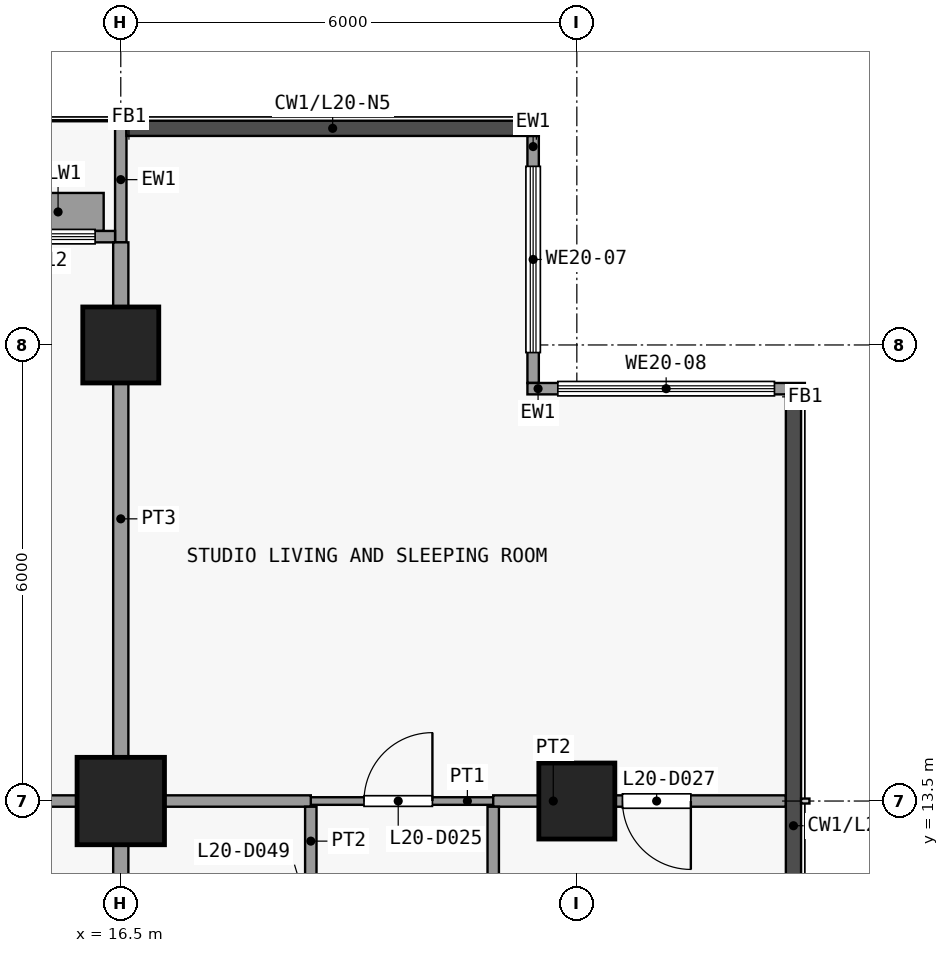
"""IFC4 building model, lengths in metres.
Left out: names, types, materials, properties, quantities, classifications, styles, units other than length and angle.
Written with IfcOpenShell. Run it as: python <this file> out.ifc"""

import sys

from ifc_helpers import new_model, si_unit, direction, frame, frame_2d, origin, origin_2d, place, context, subcontext, project, spatial, rectangle, extrude, element, fill, save


model = new_model("IFC4")
c1 = context("Model", 3, precision=1e-05, world=origin(), true_north=direction((0.0, 1.0)))
c2 = subcontext(c1, "Body", "Model", "MODEL_VIEW")
j1 = project(units=[si_unit("LENGTHUNIT", "METRE"), si_unit("PLANEANGLEUNIT", "RADIAN")], contexts=[c1])
p1 = place(None, origin())
s1 = spatial("IfcSite", under=j1, at=p1, CompositionType="ELEMENT")
p2 = place(p1, origin())
s2 = spatial("IfcBuilding", under=s1, at=p2, CompositionType="ELEMENT")
p3 = place(p2, frame((0.0, 0.0, 84.7)))
s3 = spatial("IfcBuildingStorey", under=s2, at=p3, CompositionType="ELEMENT", Elevation=84.7)
p4 = place(p3, frame((16.5, 13.5, 0.0), z_axis=(0.0, 0.0, 1.0), x_axis=(1.0, 0.0, 0.0)))
e1 = element("IfcColumn", 1, at=p4, inside=s3, PredefinedType="COLUMN", context=c2, shape_type="SweptSolid", body=[
    extrude(rectangle(XDim=1.15, YDim=1.15, at=origin_2d()), origin(), (0.0, 0.0, 1.0), 3.6),
])
for number, where, z_axis, x_axis in (
    (2, (16.5, 19.5, 0.0), (0.0, 0.0, 1.0), (1.0, 0.0, 0.0)),
    (3, (22.5, 13.5, 0.0), (0.0, 0.0, 1.0), (1.0, 0.0, 0.0)),
):
    element("IfcColumn", number, at=place(p3, frame(where, z_axis=z_axis, x_axis=x_axis)), inside=s3, PredefinedType="COLUMN", context=c2, shape_type="SweptSolid", body=[
        extrude(rectangle(XDim=1.0, YDim=1.0, at=origin_2d()), origin(), (0.0, 0.0, 1.0), 3.6),
    ])
p5 = place(p3, frame((21.925, 22.25, 0.0), z_axis=(0.0, 0.0, 1.0), x_axis=(0.0, -1.0, 0.0)))
e4 = element("IfcWall", 4, at=p5, inside=s3, PredefinedType="SOLIDWALL", context=c2, shape_type="SweptSolid", body=[
    extrude(rectangle(XDim=3.25, YDim=0.15, at=frame_2d((1.625, 0.0))), origin(), (0.0, 0.0, 1.0), 3.3),
])
p6 = place(p5, frame((0.4, 0.0, 0.9)))
e5 = element("IfcOpeningElement", 5, at=p6, cuts=e4, PredefinedType="OPENING", context=c2, shape_type="SweptSolid", body=[
    extrude(rectangle(XDim=2.45, YDim=2.4, at=frame_2d((1.225, 1.2))), frame((0.0, 0.085, 0.0), z_axis=(0.0, -1.0, 0.0), x_axis=(1.0, 0.0, 0.0)), (0.0, 0.0, 1.0), 0.17),
])
p7 = place(p3, frame((21.85, 18.925, 0.0), z_axis=(0.0, 0.0, 1.0), x_axis=(1.0, 0.0, 0.0)))
e6 = element("IfcWall", 6, at=p7, inside=s3, PredefinedType="SOLIDWALL", context=c2, shape_type="SweptSolid", body=[
    extrude(rectangle(XDim=3.65, YDim=0.15, at=frame_2d((1.825, 0.0))), origin(), (0.0, 0.0, 1.0), 3.3),
])
p8 = place(p7, frame((0.4, 0.0, 0.9)))
e7 = element("IfcOpeningElement", 7, at=p8, cuts=e6, PredefinedType="OPENING", context=c2, shape_type="SweptSolid", body=[
    extrude(rectangle(XDim=2.85, YDim=2.4, at=frame_2d((1.425, 1.2))), frame((0.0, 0.085, 0.0), z_axis=(0.0, -1.0, 0.0), x_axis=(1.0, 0.0, 0.0)), (0.0, 0.0, 1.0), 0.17),
])
p9 = place(p3, frame((16.5, 20.85, 0.0), z_axis=(0.0, 0.0, 1.0), x_axis=(0.0, 1.0, 0.0)))
e8 = element("IfcWall", 8, at=p9, inside=s3, PredefinedType="SOLIDWALL", context=c2, shape_type="SweptSolid", body=[
    extrude(rectangle(XDim=1.65, YDim=0.15, at=frame_2d((0.825, 0.0))), origin(), (0.0, 0.0, 1.0), 3.3),
])
p10 = place(p3, frame((10.575, 20.925, 0.0), z_axis=(0.0, 0.0, 1.0), x_axis=(1.0, 0.0, 0.0)))
e9 = element("IfcWall", 9, at=p10, inside=s3, PredefinedType="SOLIDWALL", context=c2, shape_type="SweptSolid", body=[
    extrude(rectangle(XDim=5.85, YDim=0.15, at=frame_2d((2.925, 0.0))), origin(), (0.0, 0.0, 1.0), 3.3),
])
p11 = place(p10, frame((2.325, 0.0, 0.0)))
e10 = element("IfcOpeningElement", 10, at=p11, cuts=e9, PredefinedType="OPENING", context=c2, shape_type="SweptSolid", body=[
    extrude(rectangle(XDim=1.2, YDim=2.4, at=frame_2d((0.6, 1.2))), frame((0.0, 0.085, 0.0), z_axis=(0.0, -1.0, 0.0), x_axis=(1.0, 0.0, 0.0)), (0.0, 0.0, 1.0), 0.17),
])
p12 = place(p10, frame((0.262, 0.0, 0.9)))
e11 = element("IfcOpeningElement", 11, at=p12, cuts=e9, PredefinedType="OPENING", context=c2, shape_type="SweptSolid", body=[
    extrude(rectangle(XDim=1.8, YDim=2.1, at=frame_2d((0.9, 1.05))), frame((0.0, 0.085, 0.0), z_axis=(0.0, -1.0, 0.0), x_axis=(1.0, 0.0, 0.0)), (0.0, 0.0, 1.0), 0.17),
])
p13 = place(p10, frame((3.788, 0.0, 0.9)))
e12 = element("IfcOpeningElement", 12, at=p13, cuts=e9, PredefinedType="OPENING", context=c2, shape_type="SweptSolid", body=[
    extrude(rectangle(XDim=1.8, YDim=2.1, at=frame_2d((0.9, 1.05))), frame((0.0, 0.085, 0.0), z_axis=(0.0, -1.0, 0.0), x_axis=(1.0, 0.0, 0.0)), (0.0, 0.0, 1.0), 0.17),
])
p14 = place(p3, frame((15.075, 21.25, 0.0), z_axis=(0.0, 0.0, 1.0), x_axis=(1.0, 0.0, 0.0)))
e13 = element("IfcWall", 13, at=p14, inside=s3, PredefinedType="USERDEFINED", context=c2, shape_type="SweptSolid", body=[
    extrude(rectangle(XDim=1.2, YDim=0.5, at=frame_2d((0.6, 0.0))), origin(), (0.0, 0.0, 1.0), 0.9),
])
p15 = place(p3, frame((19.0, 13.5, 0.0), z_axis=(0.0, 0.0, 1.0), x_axis=(1.0, 0.0, 0.0)))
e14 = element("IfcWall", 14, at=p15, inside=s3, PredefinedType="PARTITIONING", context=c2, shape_type="SweptSolid", body=[
    extrude(rectangle(XDim=2.4, YDim=0.1, at=frame_2d((1.2, 0.0))), origin(), (0.0, 0.0, 1.0), 3.3),
])
p16 = place(p15, frame((0.7, 0.0, 0.0)))
e15 = element("IfcOpeningElement", 15, at=p16, cuts=e14, PredefinedType="OPENING", context=c2, shape_type="SweptSolid", body=[
    extrude(rectangle(XDim=0.9, YDim=2.1, at=frame_2d((0.45, 1.05))), frame((0.0, 0.06, 0.0), z_axis=(0.0, -1.0, 0.0), x_axis=(1.0, 0.0, 0.0)), (0.0, 0.0, 1.0), 0.12),
])
p17 = place(p3, frame((10.65, 13.5, 0.0), z_axis=(0.0, 0.0, 1.0), x_axis=(1.0, 0.0, 0.0)))
e16 = element("IfcWall", 16, at=p17, inside=s3, PredefinedType="PARTITIONING", context=c2, shape_type="SweptSolid", body=[
    extrude(rectangle(XDim=8.35, YDim=0.15, at=frame_2d((4.175, 0.0))), origin(), (0.0, 0.0, 1.0), 3.3),
])
p18 = place(p3, frame((21.4, 13.5, 0.0), z_axis=(0.0, 0.0, 1.0), x_axis=(1.0, 0.0, 0.0)))
e17 = element("IfcWall", 17, at=p18, inside=s3, PredefinedType="PARTITIONING", context=c2, shape_type="SweptSolid", body=[
    extrude(rectangle(XDim=3.85, YDim=0.15, at=frame_2d((1.925, 0.0))), origin(), (0.0, 0.0, 1.0), 3.3),
])
p19 = place(p18, frame((1.7, 0.0, 0.0)))
e18 = element("IfcOpeningElement", 18, at=p19, cuts=e17, PredefinedType="OPENING", context=c2, shape_type="SweptSolid", body=[
    extrude(rectangle(XDim=0.9, YDim=2.1, at=frame_2d((0.45, 1.05))), frame((0.0, 0.085, 0.0), z_axis=(0.0, -1.0, 0.0), x_axis=(1.0, 0.0, 0.0)), (0.0, 0.0, 1.0), 0.17),
])
p20 = place(p3, frame((16.5, 10.6, 0.0), z_axis=(0.0, 0.0, 1.0), x_axis=(0.0, 1.0, 0.0)))
e19 = element("IfcWall", 19, at=p20, inside=s3, PredefinedType="PARTITIONING", context=c2, shape_type="SweptSolid", body=[
    extrude(rectangle(XDim=2.825, YDim=0.2, at=frame_2d((1.413, 0.0))), origin(), (0.0, 0.0, 1.0), 3.3),
])
p21 = place(p3, frame((16.5, 13.575, 0.0), z_axis=(0.0, 0.0, 1.0), x_axis=(0.0, 1.0, 0.0)))
e20 = element("IfcWall", 20, at=p21, inside=s3, PredefinedType="PARTITIONING", context=c2, shape_type="SweptSolid", body=[
    extrude(rectangle(XDim=7.275, YDim=0.2, at=frame_2d((3.638, 0.0))), origin(), (0.0, 0.0, 1.0), 3.3),
])
p22 = place(p3, frame((19.0, 10.6, 0.0), z_axis=(0.0, 0.0, 1.0), x_axis=(0.0, 1.0, 0.0)))
e21 = element("IfcWall", 21, at=p22, inside=s3, PredefinedType="PARTITIONING", context=c2, shape_type="SweptSolid", body=[
    extrude(rectangle(XDim=2.825, YDim=0.15, at=frame_2d((1.413, 0.0))), origin(), (0.0, 0.0, 1.0), 3.3),
])
p23 = place(p22, frame((0.9, 0.0, 0.0)))
e22 = element("IfcOpeningElement", 22, at=p23, cuts=e21, PredefinedType="OPENING", context=c2, shape_type="SweptSolid", body=[
    extrude(rectangle(XDim=0.9, YDim=2.1, at=frame_2d((0.45, 1.05))), frame((0.0, 0.085, 0.0), z_axis=(0.0, -1.0, 0.0), x_axis=(1.0, 0.0, 0.0)), (0.0, 0.0, 1.0), 0.17),
])
p24 = place(p3, frame((21.4, 10.6, 0.0), z_axis=(0.0, 0.0, 1.0), x_axis=(0.0, 1.0, 0.0)))
e23 = element("IfcWall", 23, at=p24, inside=s3, PredefinedType="PARTITIONING", context=c2, shape_type="SweptSolid", body=[
    extrude(rectangle(XDim=2.825, YDim=0.15, at=frame_2d((1.413, 0.0))), origin(), (0.0, 0.0, 1.0), 3.3),
])
p25 = place(p6, origin())
e24 = element("IfcWindow", 24, at=p25, inside=s3, PartitioningType="SINGLE_PANEL", PredefinedType="WINDOW", context=c2, shape_type="SweptSolid", body=[
    extrude(rectangle(XDim=2.45, YDim=2.4, at=frame_2d((1.225, 1.2))), frame((0.0, 0.03, 0.0), z_axis=(0.0, -1.0, 0.0), x_axis=(1.0, 0.0, 0.0)), (0.0, 0.0, 1.0), 0.06),
])
fill(e5, e24)
p26 = place(p8, origin())
e25 = element("IfcWindow", 25, at=p26, inside=s3, PartitioningType="SINGLE_PANEL", PredefinedType="WINDOW", context=c2, shape_type="SweptSolid", body=[
    extrude(rectangle(XDim=2.85, YDim=2.4, at=frame_2d((1.425, 1.2))), frame((0.0, 0.03, 0.0), z_axis=(0.0, -1.0, 0.0), x_axis=(1.0, 0.0, 0.0)), (0.0, 0.0, 1.0), 0.06),
])
fill(e7, e25)
p27 = place(p13, origin())
e26 = element("IfcWindow", 26, at=p27, inside=s3, PartitioningType="SINGLE_PANEL", PredefinedType="WINDOW", context=c2, shape_type="SweptSolid", body=[
    extrude(rectangle(XDim=1.8, YDim=2.1, at=frame_2d((0.9, 1.05))), frame((0.0, 0.03, 0.0), z_axis=(0.0, -1.0, 0.0), x_axis=(1.0, 0.0, 0.0)), (0.0, 0.0, 1.0), 0.06),
])
fill(e12, e26)
p28 = place(p16, origin())
e27 = element("IfcDoor", 27, at=p28, inside=s3, OperationType="SINGLE_SWING_LEFT", PredefinedType="DOOR", context=c2, shape_type="SweptSolid", body=[
    extrude(rectangle(XDim=0.9, YDim=2.1, at=frame_2d((0.45, 1.05))), frame((0.0, 0.025, 0.0), z_axis=(0.0, -1.0, 0.0), x_axis=(1.0, 0.0, 0.0)), (0.0, 0.0, 1.0), 0.05),
])
fill(e15, e27)
p29 = place(p19, origin())
e28 = element("IfcDoor", 28, at=p29, inside=s3, OperationType="SINGLE_SWING_RIGHT", PredefinedType="DOOR", context=c2, shape_type="SweptSolid", body=[
    extrude(rectangle(XDim=0.9, YDim=2.1, at=frame_2d((0.45, 1.05))), frame((0.0, 0.025, 0.0), z_axis=(0.0, -1.0, 0.0), x_axis=(1.0, 0.0, 0.0)), (0.0, 0.0, 1.0), 0.05),
])
fill(e18, e28)
save(model, sys.argv[1])
